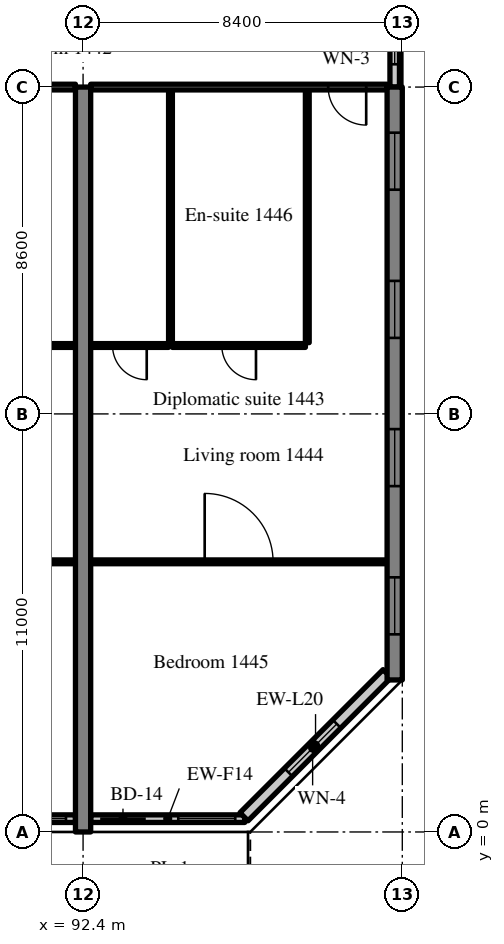
"""IFC4 building model, lengths in metres.
Left out: names, types, materials, properties, quantities, classifications, styles, units other than length and angle.
Written with IfcOpenShell. Run it as: python <this file> out.ifc"""

import sys

from ifc_helpers import new_model, si_unit, direction, frame, frame_2d, origin, place, context, subcontext, project, spatial, rectangle, extrude, source, transform, mapped, element, fill, save


model = new_model("IFC4")
c1 = context("Model", 3, precision=1e-05, world=origin(), true_north=direction((0.0, 1.0)))
c2 = subcontext(c1, "Body", "Model", "MODEL_VIEW")
j1 = project(units=[si_unit("LENGTHUNIT", "METRE"), si_unit("PLANEANGLEUNIT", "RADIAN")], contexts=[c1])
p1 = place(None, origin())
s1 = spatial("IfcSite", under=j1, at=p1, CompositionType="ELEMENT")
p2 = place(p1, origin())
s2 = spatial("IfcBuilding", under=s1, at=p2, CompositionType="ELEMENT")
p3 = place(p2, frame((0.0, 0.0, 62.0)))
s3 = spatial("IfcBuildingStorey", under=s2, at=p3, CompositionType="ELEMENT", Elevation=62.0)
m1 = source(origin(), c2, "Body", "SweptSolid", [
    extrude(rectangle(XDim=19.6, YDim=0.4, at=frame_2d((9.8, 0.0))), origin(), (0.0, 0.0, 1.0), 3.52),
])
p4 = place(p3, frame((92.4, 0.0, 0.0), z_axis=(0.0, 0.0, 1.0), x_axis=(0.0, 1.0, 0.0)))
e1 = element("IfcWall", 1, at=p4, inside=s3, PredefinedType="SHEAR", context=c2, shape_type="MappedRepresentation", body=[
    mapped(m1, transform((0.0, 0.0, 0.0), scale=1.0)),
])
m2 = source(origin(), c2, "Body", "SweptSolid", [
    extrude(rectangle(XDim=15.6, YDim=0.4, at=frame_2d((7.8, 0.0))), origin(), (0.0, 0.0, 1.0), 3.52),
])
p5 = place(p3, frame((100.6, 4.0, 0.0), z_axis=(0.0, 0.0, 1.0), x_axis=(0.0, 1.0, 0.0)))
e2 = element("IfcWall", 2, at=p5, inside=s3, PredefinedType="SHEAR", context=c2, shape_type="MappedRepresentation", body=[
    mapped(m2, transform((0.0, 0.0, 0.0), scale=1.0)),
])
m3 = source(origin(), c2, "Body", "SweptSolid", [
    extrude(rectangle(XDim=1.5, YDim=1.5, at=frame_2d((0.75, 0.75))), frame((0.0, 0.21, 0.0), z_axis=(0.0, -1.0, 0.0), x_axis=(1.0, 0.0, 0.0)), (0.0, 0.0, 1.0), 0.42),
])
p6 = place(p5, frame((1.2, 0.0, 0.9)))
e3 = element("IfcOpeningElement", 3, at=p6, cuts=e2, PredefinedType="OPENING", context=c2, shape_type="MappedRepresentation", body=[
    mapped(m3, transform((0.0, 0.0, 0.0), scale=1.0)),
])
p7 = place(p5, frame((5.1, 0.0, 0.9)))
e4 = element("IfcOpeningElement", 4, at=p7, cuts=e2, PredefinedType="OPENING", context=c2, shape_type="MappedRepresentation", body=[
    mapped(m3, transform((0.0, 0.0, 0.0), scale=1.0)),
])
p8 = place(p5, frame((9.0, 0.0, 0.9)))
e5 = element("IfcOpeningElement", 5, at=p8, cuts=e2, PredefinedType="OPENING", context=c2, shape_type="MappedRepresentation", body=[
    mapped(m3, transform((0.0, 0.0, 0.0), scale=1.0)),
])
p9 = place(p5, frame((12.9, 0.0, 0.9)))
e6 = element("IfcOpeningElement", 6, at=p9, cuts=e2, PredefinedType="OPENING", context=c2, shape_type="MappedRepresentation", body=[
    mapped(m3, transform((0.0, 0.0, 0.0), scale=1.0)),
])
m4 = source(origin(), c2, "Body", "SweptSolid", [
    extrude(rectangle(XDim=3.6, YDim=0.2, at=frame_2d((1.8, 0.0))), origin(), (0.0, 0.0, 1.0), 2.82),
])
p10 = place(p3, frame((88.6, 0.35, 0.0), z_axis=(0.0, 0.0, 1.0), x_axis=(1.0, 0.0, 0.0)))
e7 = element("IfcWall", 7, at=p10, inside=s3, PredefinedType="SOLIDWALL", context=c2, shape_type="MappedRepresentation", body=[
    mapped(m4, transform((0.0, 0.0, 0.0), scale=1.0)),
])
m5 = source(origin(), c2, "Body", "SweptSolid", [
    extrude(rectangle(XDim=1.2, YDim=2.4, at=frame_2d((0.6, 1.2))), frame((0.0, 0.11, 0.0), z_axis=(0.0, -1.0, 0.0), x_axis=(1.0, 0.0, 0.0)), (0.0, 0.0, 1.0), 0.22),
])
p11 = place(p10, frame((0.25, 0.0, 0.0)))
e8 = element("IfcOpeningElement", 8, at=p11, cuts=e7, PredefinedType="OPENING", context=c2, shape_type="MappedRepresentation", body=[
    mapped(m5, transform((0.0, 0.0, 0.0), scale=1.0)),
])
m6 = source(origin(), c2, "Body", "SweptSolid", [
    extrude(rectangle(XDim=1.5, YDim=1.5, at=frame_2d((0.75, 0.75))), frame((0.0, 0.11, 0.0), z_axis=(0.0, -1.0, 0.0), x_axis=(1.0, 0.0, 0.0)), (0.0, 0.0, 1.0), 0.22),
])
p12 = place(p10, frame((1.85, 0.0, 0.9)))
e9 = element("IfcOpeningElement", 9, at=p12, cuts=e7, PredefinedType="OPENING", context=c2, shape_type="MappedRepresentation", body=[
    mapped(m6, transform((0.0, 0.0, 0.0), scale=1.0)),
])
m7 = source(origin(), c2, "Body", "SweptSolid", [
    extrude(rectangle(XDim=4.055, YDim=0.2, at=frame_2d((2.027, 0.0))), origin(), (0.0, 0.0, 1.0), 2.82),
])
p13 = place(p3, frame((92.6, 0.35, 0.0), z_axis=(0.0, 0.0, 1.0), x_axis=(1.0, 0.0, 0.0)))
e10 = element("IfcWall", 10, at=p13, inside=s3, PredefinedType="SOLIDWALL", context=c2, shape_type="MappedRepresentation", body=[
    mapped(m7, transform((0.0, 0.0, 0.0), scale=1.0)),
])
p14 = place(p13, frame((0.25, 0.0, 0.0)))
e11 = element("IfcOpeningElement", 11, at=p14, cuts=e10, PredefinedType="OPENING", context=c2, shape_type="MappedRepresentation", body=[
    mapped(m5, transform((0.0, 0.0, 0.0), scale=1.0)),
])
p15 = place(p13, frame((2.305, 0.0, 0.9)))
e12 = element("IfcOpeningElement", 12, at=p15, cuts=e10, PredefinedType="OPENING", context=c2, shape_type="MappedRepresentation", body=[
    mapped(m6, transform((0.0, 0.0, 0.0), scale=1.0)),
])
m8 = source(origin(), c2, "Body", "SweptSolid", [
    extrude(rectangle(XDim=5.326, YDim=0.3, at=frame_2d((2.663, 0.0))), origin(), (0.0, 0.0, 1.0), 3.52),
])
p16 = place(p3, frame((96.634, 0.4, 0.0), z_axis=(0.0, 0.0, 1.0), x_axis=(0.707083859269, 0.707129702361, 0.0)))
e13 = element("IfcWall", 13, at=p16, inside=s3, PredefinedType="SOLIDWALL", context=c2, shape_type="MappedRepresentation", body=[
    mapped(m8, transform((0.0, 0.0, 0.0), scale=1.0)),
])
m9 = source(origin(), c2, "Body", "SweptSolid", [
    extrude(rectangle(XDim=1.8, YDim=1.5, at=frame_2d((0.9, 0.75))), frame((0.0, 0.16, 0.0), z_axis=(0.0, -1.0, 0.0), x_axis=(1.0, 0.0, 0.0)), (0.0, 0.0, 1.0), 0.32),
])
p17 = place(p16, frame((1.654, 0.0, 0.9)))
e14 = element("IfcOpeningElement", 14, at=p17, cuts=e13, PredefinedType="OPENING", context=c2, shape_type="MappedRepresentation", body=[
    mapped(m9, transform((0.0, 0.0, 0.0), scale=1.0)),
])
m10 = source(origin(), c2, "Body", "SweptSolid", [
    extrude(rectangle(XDim=2.4, YDim=0.25, at=frame_2d((1.2, 0.0))), origin(), (0.0, 0.0, 1.0), 2.62),
])
p18 = place(p3, frame((100.6, 19.6, 0.0), z_axis=(0.0, 0.0, 1.0), x_axis=(0.0, 1.0, 0.0)))
e15 = element("IfcWall", 15, at=p18, inside=s3, PredefinedType="SOLIDWALL", context=c2, shape_type="MappedRepresentation", body=[
    mapped(m10, transform((0.0, 0.0, 0.0), scale=1.0)),
])
m11 = source(origin(), c2, "Body", "SweptSolid", [
    extrude(rectangle(XDim=1.2, YDim=1.5, at=frame_2d((0.6, 0.75))), frame((0.0, 0.135, 0.0), z_axis=(0.0, -1.0, 0.0), x_axis=(1.0, 0.0, 0.0)), (0.0, 0.0, 1.0), 0.27),
])
p19 = place(p18, frame((0.6, 0.0, 0.9)))
e16 = element("IfcOpeningElement", 16, at=p19, cuts=e15, PredefinedType="OPENING", context=c2, shape_type="MappedRepresentation", body=[
    mapped(m11, transform((0.0, 0.0, 0.0), scale=1.0)),
])
m12 = source(origin(), c2, "Body", "SweptSolid", [
    extrude(rectangle(XDim=2.25, YDim=0.1, at=frame_2d((1.125, 0.0))), origin(), (0.0, 0.0, 1.0), 3.52),
])
p20 = place(p3, frame((89.95, 12.8, 0.0), z_axis=(0.0, 0.0, 1.0), x_axis=(1.0, 0.0, 0.0)))
e17 = element("IfcWall", 17, at=p20, inside=s3, PredefinedType="PARTITIONING", context=c2, shape_type="MappedRepresentation", body=[
    mapped(m12, transform((0.0, 0.0, 0.0), scale=1.0)),
])
m13 = source(origin(), c2, "Body", "SweptSolid", [
    extrude(rectangle(XDim=0.9, YDim=2.1, at=frame_2d((0.45, 1.05))), frame((0.0, 0.06, 0.0), z_axis=(0.0, -1.0, 0.0), x_axis=(1.0, 0.0, 0.0)), (0.0, 0.0, 1.0), 0.12),
])
p21 = place(p20, frame((0.675, 0.0, 0.0)))
e18 = element("IfcOpeningElement", 18, at=p21, cuts=e17, PredefinedType="OPENING", context=c2, shape_type="MappedRepresentation", body=[
    mapped(m13, transform((0.0, 0.0, 0.0), scale=1.0)),
])
m14 = source(origin(), c2, "Body", "SweptSolid", [
    extrude(rectangle(XDim=8.0, YDim=0.1, at=frame_2d((4.0, 0.0))), origin(), (0.0, 0.0, 1.0), 3.52),
])
p22 = place(p3, frame((84.2, 7.108, 0.0), z_axis=(0.0, 0.0, 1.0), x_axis=(1.0, 0.0, 0.0)))
e19 = element("IfcWall", 19, at=p22, inside=s3, PredefinedType="PARTITIONING", context=c2, shape_type="MappedRepresentation", body=[
    mapped(m14, transform((0.0, 0.0, 0.0), scale=1.0)),
])
m15 = source(origin(), c2, "Body", "SweptSolid", [
    extrude(rectangle(XDim=1.8, YDim=2.1, at=frame_2d((0.9, 1.05))), frame((0.0, 0.06, 0.0), z_axis=(0.0, -1.0, 0.0), x_axis=(1.0, 0.0, 0.0)), (0.0, 0.0, 1.0), 0.12),
])
p23 = place(p22, frame((3.1, 0.0, 0.0)))
e20 = element("IfcOpeningElement", 20, at=p23, cuts=e19, PredefinedType="OPENING", context=c2, shape_type="MappedRepresentation", body=[
    mapped(m15, transform((0.0, 0.0, 0.0), scale=1.0)),
])
m16 = source(origin(), c2, "Body", "SweptSolid", [
    extrude(rectangle(XDim=8.0, YDim=0.15, at=frame_2d((4.0, 0.0))), origin(), (0.0, 0.0, 1.0), 2.82),
])
p24 = place(p3, frame((84.2, 19.6, 0.0), z_axis=(0.0, 0.0, 1.0), x_axis=(1.0, 0.0, 0.0)))
e21 = element("IfcWall", 21, at=p24, inside=s3, PredefinedType="PARTITIONING", context=c2, shape_type="MappedRepresentation", body=[
    mapped(m16, transform((0.0, 0.0, 0.0), scale=1.0)),
])
m17 = source(origin(), c2, "Body", "SweptSolid", [
    extrude(rectangle(XDim=1.0, YDim=2.1, at=frame_2d((0.5, 1.05))), frame((0.0, 0.085, 0.0), z_axis=(0.0, -1.0, 0.0), x_axis=(1.0, 0.0, 0.0)), (0.0, 0.0, 1.0), 0.17),
])
p25 = place(p24, frame((0.55, 0.0, 0.0)))
e22 = element("IfcOpeningElement", 22, at=p25, cuts=e21, PredefinedType="OPENING", context=c2, shape_type="MappedRepresentation", body=[
    mapped(m17, transform((0.0, 0.0, 0.0), scale=1.0)),
])
m18 = source(origin(), c2, "Body", "SweptSolid", [
    extrude(rectangle(XDim=6.65, YDim=0.1, at=frame_2d((3.325, 0.0))), origin(), (0.0, 0.0, 1.0), 3.52),
])
for number, where, z_axis, x_axis in (
    (23, (98.3, 12.875, 0.0), (0.0, 0.0, 1.0), (0.0, 1.0, 0.0)),
    (24, (94.7, 12.875, 0.0), (0.0, 0.0, 1.0), (0.0, 1.0, 0.0)),
):
    element("IfcWall", number, at=place(p3, frame(where, z_axis=z_axis, x_axis=x_axis)), inside=s3, PredefinedType="PARTITIONING", context=c2, shape_type="MappedRepresentation", body=[
        mapped(m18, transform((0.0, 0.0, 0.0), scale=1.0)),
    ])
m19 = source(origin(), c2, "Body", "SweptSolid", [
    extrude(rectangle(XDim=3.5, YDim=0.1, at=frame_2d((1.75, 0.0))), origin(), (0.0, 0.0, 1.0), 3.52),
])
p26 = place(p3, frame((94.75, 12.8, 0.0), z_axis=(0.0, 0.0, 1.0), x_axis=(1.0, 0.0, 0.0)))
e25 = element("IfcWall", 25, at=p26, inside=s3, PredefinedType="PARTITIONING", context=c2, shape_type="MappedRepresentation", body=[
    mapped(m19, transform((0.0, 0.0, 0.0), scale=1.0)),
])
p27 = place(p26, frame((1.3, 0.0, 0.0)))
e26 = element("IfcOpeningElement", 26, at=p27, cuts=e25, PredefinedType="OPENING", context=c2, shape_type="MappedRepresentation", body=[
    mapped(m13, transform((0.0, 0.0, 0.0), scale=1.0)),
])
m20 = source(origin(), c2, "Body", "SweptSolid", [
    extrude(rectangle(XDim=2.05, YDim=0.1, at=frame_2d((1.025, 0.0))), origin(), (0.0, 0.0, 1.0), 3.52),
])
p28 = place(p3, frame((92.6, 12.8, 0.0), z_axis=(0.0, 0.0, 1.0), x_axis=(1.0, 0.0, 0.0)))
e27 = element("IfcWall", 27, at=p28, inside=s3, PredefinedType="PARTITIONING", context=c2, shape_type="MappedRepresentation", body=[
    mapped(m20, transform((0.0, 0.0, 0.0), scale=1.0)),
])
p29 = place(p28, frame((0.575, 0.0, 0.0)))
e28 = element("IfcOpeningElement", 28, at=p29, cuts=e27, PredefinedType="OPENING", context=c2, shape_type="MappedRepresentation", body=[
    mapped(m13, transform((0.0, 0.0, 0.0), scale=1.0)),
])
m21 = source(origin(), c2, "Body", "SweptSolid", [
    extrude(rectangle(XDim=7.8, YDim=0.1, at=frame_2d((3.9, 0.0))), origin(), (0.0, 0.0, 1.0), 3.52),
])
p30 = place(p3, frame((92.6, 7.108, 0.0), z_axis=(0.0, 0.0, 1.0), x_axis=(1.0, 0.0, 0.0)))
e29 = element("IfcWall", 29, at=p30, inside=s3, PredefinedType="PARTITIONING", context=c2, shape_type="MappedRepresentation", body=[
    mapped(m21, transform((0.0, 0.0, 0.0), scale=1.0)),
])
p31 = place(p30, frame((3.0, 0.0, 0.0)))
e30 = element("IfcOpeningElement", 30, at=p31, cuts=e29, PredefinedType="OPENING", context=c2, shape_type="MappedRepresentation", body=[
    mapped(m15, transform((0.0, 0.0, 0.0), scale=1.0)),
])
m22 = source(origin(), c2, "Body", "SweptSolid", [
    extrude(rectangle(XDim=7.8, YDim=0.15, at=frame_2d((3.9, 0.0))), origin(), (0.0, 0.0, 1.0), 2.82),
])
p32 = place(p3, frame((92.6, 19.6, 0.0), z_axis=(0.0, 0.0, 1.0), x_axis=(1.0, 0.0, 0.0)))
e31 = element("IfcWall", 31, at=p32, inside=s3, PredefinedType="PARTITIONING", context=c2, shape_type="MappedRepresentation", body=[
    mapped(m22, transform((0.0, 0.0, 0.0), scale=1.0)),
])
p33 = place(p32, frame((6.25, 0.0, 0.0)))
e32 = element("IfcOpeningElement", 32, at=p33, cuts=e31, PredefinedType="OPENING", context=c2, shape_type="MappedRepresentation", body=[
    mapped(m17, transform((0.0, 0.0, 0.0), scale=1.0)),
])
m23 = source(origin(), c2, "Body", "SweptSolid", [
    extrude(rectangle(XDim=1.5, YDim=1.5, at=frame_2d((0.75, 0.75))), frame((0.0, 0.03, 0.0), z_axis=(0.0, -1.0, 0.0), x_axis=(1.0, 0.0, 0.0)), (0.0, 0.0, 1.0), 0.06),
])
p34 = place(p12, origin())
e33 = element("IfcWindow", 33, at=p34, inside=s3, PartitioningType="SINGLE_PANEL", PredefinedType="WINDOW", context=c2, shape_type="MappedRepresentation", body=[
    mapped(m23, transform((0.0, 0.0, 0.0), scale=1.0)),
])
fill(e9, e33)
m24 = source(origin(), c2, "Body", "SweptSolid", [
    extrude(rectangle(XDim=1.2, YDim=2.4, at=frame_2d((0.6, 1.2))), frame((0.0, 0.025, 0.0), z_axis=(0.0, -1.0, 0.0), x_axis=(1.0, 0.0, 0.0)), (0.0, 0.0, 1.0), 0.05),
])
p35 = place(p14, origin())
e34 = element("IfcDoor", 34, at=p35, inside=s3, OperationType="SLIDING_TO_RIGHT", PredefinedType="DOOR", context=c2, shape_type="MappedRepresentation", body=[
    mapped(m24, transform((0.0, 0.0, 0.0), scale=1.0)),
])
fill(e11, e34)
p36 = place(p15, origin())
e35 = element("IfcWindow", 35, at=p36, inside=s3, PartitioningType="SINGLE_PANEL", PredefinedType="WINDOW", context=c2, shape_type="MappedRepresentation", body=[
    mapped(m23, transform((0.0, 0.0, 0.0), scale=1.0)),
])
fill(e12, e35)
m25 = source(origin(), c2, "Body", "SweptSolid", [
    extrude(rectangle(XDim=1.8, YDim=1.5, at=frame_2d((0.9, 0.75))), frame((0.0, 0.03, 0.0), z_axis=(0.0, -1.0, 0.0), x_axis=(1.0, 0.0, 0.0)), (0.0, 0.0, 1.0), 0.06),
])
p37 = place(p17, origin())
e36 = element("IfcWindow", 36, at=p37, inside=s3, PartitioningType="SINGLE_PANEL", PredefinedType="WINDOW", context=c2, shape_type="MappedRepresentation", body=[
    mapped(m25, transform((0.0, 0.0, 0.0), scale=1.0)),
])
fill(e14, e36)
p38 = place(p6, origin())
e37 = element("IfcWindow", 37, at=p38, inside=s3, PartitioningType="SINGLE_PANEL", PredefinedType="WINDOW", context=c2, shape_type="MappedRepresentation", body=[
    mapped(m23, transform((0.0, 0.0, 0.0), scale=1.0)),
])
fill(e3, e37)
p39 = place(p7, origin())
e38 = element("IfcWindow", 38, at=p39, inside=s3, PartitioningType="SINGLE_PANEL", PredefinedType="WINDOW", context=c2, shape_type="MappedRepresentation", body=[
    mapped(m23, transform((0.0, 0.0, 0.0), scale=1.0)),
])
fill(e4, e38)
p40 = place(p8, origin())
e39 = element("IfcWindow", 39, at=p40, inside=s3, PartitioningType="SINGLE_PANEL", PredefinedType="WINDOW", context=c2, shape_type="MappedRepresentation", body=[
    mapped(m23, transform((0.0, 0.0, 0.0), scale=1.0)),
])
fill(e5, e39)
p41 = place(p9, origin())
e40 = element("IfcWindow", 40, at=p41, inside=s3, PartitioningType="SINGLE_PANEL", PredefinedType="WINDOW", context=c2, shape_type="MappedRepresentation", body=[
    mapped(m23, transform((0.0, 0.0, 0.0), scale=1.0)),
])
fill(e6, e40)
m26 = source(origin(), c2, "Body", "SweptSolid", [
    extrude(rectangle(XDim=1.2, YDim=1.5, at=frame_2d((0.6, 0.75))), frame((0.0, 0.03, 0.0), z_axis=(0.0, -1.0, 0.0), x_axis=(1.0, 0.0, 0.0)), (0.0, 0.0, 1.0), 0.06),
])
p42 = place(p19, origin())
e41 = element("IfcWindow", 41, at=p42, inside=s3, PartitioningType="SINGLE_PANEL", PredefinedType="WINDOW", context=c2, shape_type="MappedRepresentation", body=[
    mapped(m26, transform((0.0, 0.0, 0.0), scale=1.0)),
])
fill(e16, e41)
m27 = source(origin(), c2, "Body", "SweptSolid", [
    extrude(rectangle(XDim=0.9, YDim=2.1, at=frame_2d((0.45, 1.05))), frame((0.0, 0.025, 0.0), z_axis=(0.0, -1.0, 0.0), x_axis=(1.0, 0.0, 0.0)), (0.0, 0.0, 1.0), 0.05),
])
p43 = place(p27, origin())
e42 = element("IfcDoor", 42, at=p43, inside=s3, OperationType="SINGLE_SWING_RIGHT", PredefinedType="DOOR", context=c2, shape_type="MappedRepresentation", body=[
    mapped(m27, transform((0.0, 0.0, 0.0), scale=1.0)),
])
fill(e26, e42)
p44 = place(p29, origin())
e43 = element("IfcDoor", 43, at=p44, inside=s3, OperationType="SINGLE_SWING_RIGHT", PredefinedType="DOOR", context=c2, shape_type="MappedRepresentation", body=[
    mapped(m27, transform((0.0, 0.0, 0.0), scale=1.0)),
])
fill(e28, e43)
m28 = source(origin(), c2, "Body", "SweptSolid", [
    extrude(rectangle(XDim=1.8, YDim=2.1, at=frame_2d((0.9, 1.05))), frame((0.0, 0.025, 0.0), z_axis=(0.0, -1.0, 0.0), x_axis=(1.0, 0.0, 0.0)), (0.0, 0.0, 1.0), 0.05),
])
p45 = place(p31, origin())
e44 = element("IfcDoor", 44, at=p45, inside=s3, OperationType="DOUBLE_DOOR_SINGLE_SWING", PredefinedType="DOOR", context=c2, shape_type="MappedRepresentation", body=[
    mapped(m28, transform((0.0, 0.0, 0.0), scale=1.0)),
])
fill(e30, e44)
m29 = source(origin(), c2, "Body", "SweptSolid", [
    extrude(rectangle(XDim=1.0, YDim=2.1, at=frame_2d((0.5, 1.05))), frame((0.0, 0.025, 0.0), z_axis=(0.0, -1.0, 0.0), x_axis=(1.0, 0.0, 0.0)), (0.0, 0.0, 1.0), 0.05),
])
p46 = place(p33, origin())
e45 = element("IfcDoor", 45, at=p46, inside=s3, OperationType="SINGLE_SWING_RIGHT", PredefinedType="DOOR", context=c2, shape_type="MappedRepresentation", body=[
    mapped(m29, transform((0.0, 0.0, 0.0), scale=1.0)),
])
fill(e32, e45)
save(model, sys.argv[1])
